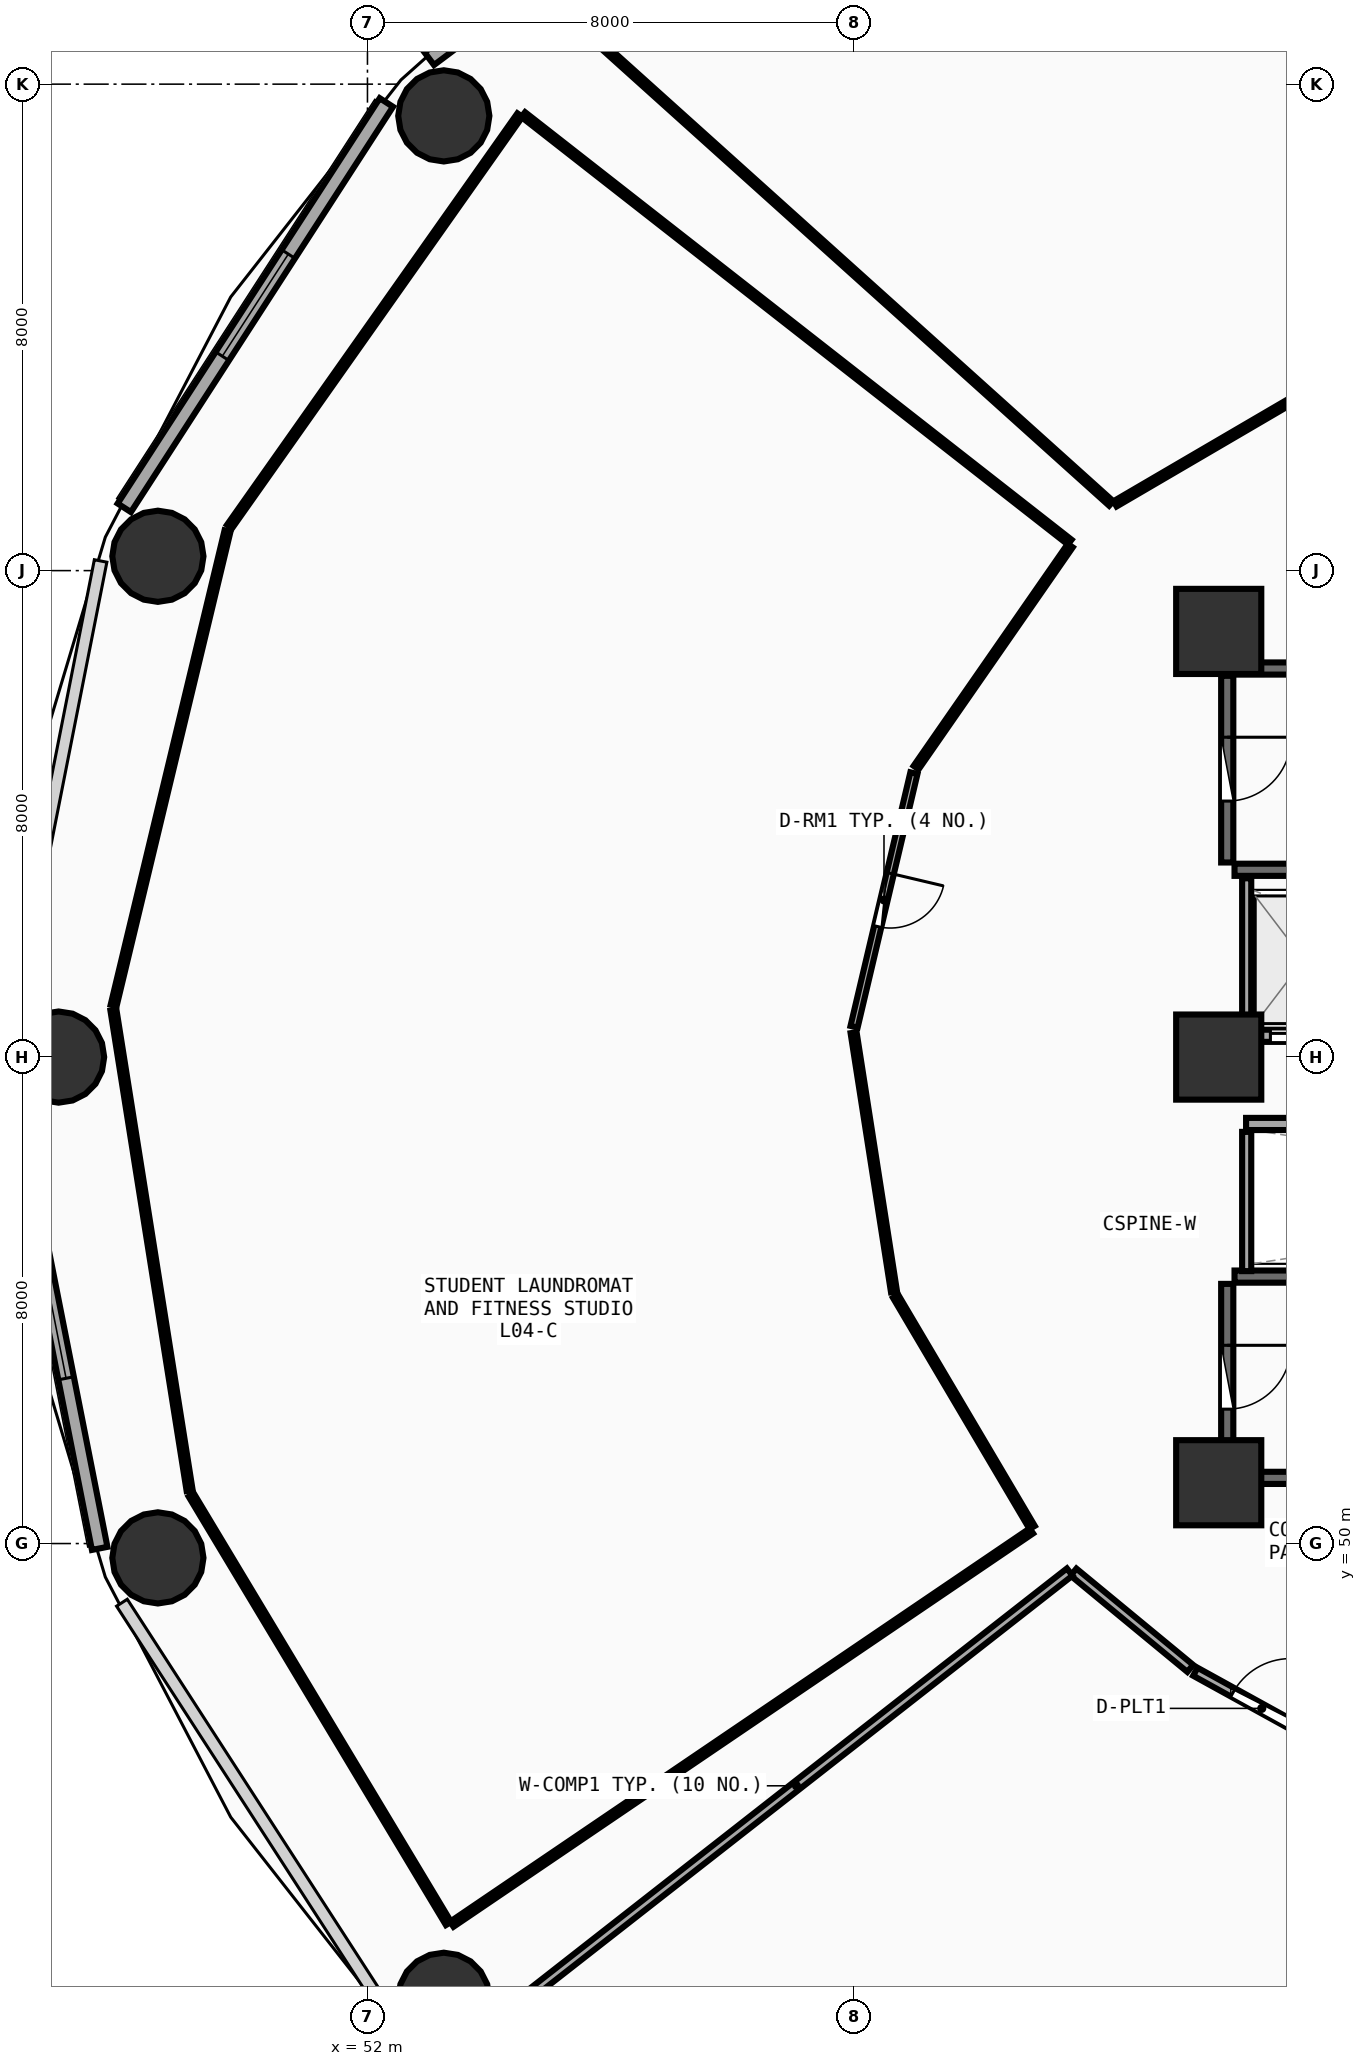
"""IFC4 building model, lengths in metres.
Left out: names, types, materials, properties, quantities, classifications, styles, units other than length and angle.
Written with IfcOpenShell. Run it as: python <this file> out.ifc"""

import sys

from ifc_helpers import new_model, si_unit, direction, frame, frame_2d, origin, origin_2d, place, context, subcontext, project, spatial, rectangle, circle, extrude, element, fill, save


model = new_model("IFC4")
c1 = context("Model", 3, precision=1e-05, world=origin(), true_north=direction((0.0, 1.0)))
c2 = subcontext(c1, "Body", "Model", "MODEL_VIEW")
j1 = project(units=[si_unit("LENGTHUNIT", "METRE"), si_unit("PLANEANGLEUNIT", "RADIAN")], contexts=[c1])
p1 = place(None, origin())
s1 = spatial("IfcSite", under=j1, at=p1, CompositionType="ELEMENT")
p2 = place(p1, origin())
s2 = spatial("IfcBuilding", under=s1, at=p2, CompositionType="ELEMENT")
p3 = place(p2, frame((0.0, 0.0, 18.0)))
s3 = spatial("IfcBuildingStorey", under=s2, at=p3, CompositionType="ELEMENT", Elevation=18.0)
for number, where, z_axis, x_axis in (
    (1, (66.0, 51.0, 0.0), (0.0, 0.0, 1.0), (1.0, 0.0, 0.0)),
    (2, (66.0, 65.0, 0.0), (0.0, 0.0, 1.0), (1.0, 0.0, 0.0)),
    (3, (66.0, 58.0, 0.0), (0.0, 0.0, 1.0), (1.0, 0.0, 0.0)),
):
    element("IfcColumn", number, at=place(p3, frame(where, z_axis=z_axis, x_axis=x_axis)), inside=s3, PredefinedType="PILASTER", context=c2, shape_type="SweptSolid", body=[
        extrude(rectangle(XDim=1.4, YDim=1.4, at=origin_2d()), origin(), (0.0, 0.0, 1.0), 4.5),
    ])
for number, where, z_axis, x_axis in (
    (4, (53.256, 73.478, 0.0), (0.0, 0.0, 1.0), (1.0, 0.0, 0.0)),
    (5, (48.553, 66.236, 0.0), (0.0, 0.0, 1.0), (1.0, 0.0, 0.0)),
    (6, (46.92, 58.0, 0.0), (0.0, 0.0, 1.0), (1.0, 0.0, 0.0)),
    (7, (48.553, 49.764, 0.0), (0.0, 0.0, 1.0), (1.0, 0.0, 0.0)),
    (8, (53.256, 42.522, 0.0), (0.0, 0.0, 1.0), (1.0, 0.0, 0.0)),
):
    element("IfcColumn", number, at=place(p3, frame(where, z_axis=z_axis, x_axis=x_axis)), inside=s3, PredefinedType="COLUMN", context=c2, shape_type="SweptSolid", body=[
        extrude(circle(Radius=0.75, at=origin_2d()), origin(), (0.0, 0.0, 1.0), 4.5),
    ])
p4 = place(p3, frame((59.651, 79.389, 0.0), z_axis=(0.0, 0.0, 1.0), x_axis=(-0.80030733173, -0.599590005569, 0.0)))
e9 = element("IfcWall", 9, at=p4, inside=s3, PredefinedType="SOLIDWALL", context=c2, shape_type="SweptSolid", body=[
    extrude(rectangle(XDim=8.291, YDim=0.26, at=frame_2d((4.145, 0.0))), origin(), (0.0, 0.0, 1.0), 4.225),
])
p5 = place(p4, frame((3.145, 0.0, 0.85)))
e10 = element("IfcOpeningElement", 10, at=p5, cuts=e9, PredefinedType="OPENING", context=c2, shape_type="SweptSolid", body=[
    extrude(rectangle(XDim=2.0, YDim=1.75, at=frame_2d((1.0, 0.875))), frame((0.0, 0.14, 0.0), z_axis=(0.0, -1.0, 0.0), x_axis=(1.0, 0.0, 0.0)), (0.0, 0.0, 1.0), 0.28),
])
p6 = place(p3, frame((52.311, 73.698, 0.0), z_axis=(0.0, 0.0, 1.0), x_axis=(-0.543005114258, -0.839729388488, 0.0)))
e11 = element("IfcWall", 11, at=p6, inside=s3, PredefinedType="SOLIDWALL", context=c2, shape_type="SweptSolid", body=[
    extrude(rectangle(XDim=7.938, YDim=0.26, at=frame_2d((3.969, 0.0))), origin(), (0.0, 0.0, 1.0), 4.225),
])
p7 = place(p6, frame((2.969, 0.0, 0.85)))
e12 = element("IfcOpeningElement", 12, at=p7, cuts=e11, PredefinedType="OPENING", context=c2, shape_type="SweptSolid", body=[
    extrude(rectangle(XDim=2.0, YDim=1.75, at=frame_2d((1.0, 0.875))), frame((0.0, 0.14, 0.0), z_axis=(0.0, -1.0, 0.0), x_axis=(1.0, 0.0, 0.0)), (0.0, 0.0, 1.0), 0.28),
])
p8 = place(p3, frame((46.104, 57.477, 0.0), z_axis=(0.0, 0.0, 1.0), x_axis=(0.193726159581, -0.98105564322, 0.0)))
e13 = element("IfcWall", 13, at=p8, inside=s3, PredefinedType="SOLIDWALL", context=c2, shape_type="SweptSolid", body=[
    extrude(rectangle(XDim=7.703, YDim=0.26, at=frame_2d((3.851, 0.0))), origin(), (0.0, 0.0, 1.0), 4.225),
])
p9 = place(p8, frame((2.851, 0.0, 0.85)))
e14 = element("IfcOpeningElement", 14, at=p9, cuts=e13, PredefinedType="OPENING", context=c2, shape_type="SweptSolid", body=[
    extrude(rectangle(XDim=2.0, YDim=1.75, at=frame_2d((1.0, 0.875))), frame((0.0, 0.14, 0.0), z_axis=(0.0, -1.0, 0.0), x_axis=(1.0, 0.0, 0.0)), (0.0, 0.0, 1.0), 0.28),
])
for number, where, z_axis, x_axis in (
    (15, (66.26, 61.08, 0.0), (0.0, 0.0, 1.0), (1.0, 0.0, 0.0)),
    (16, (73.42, 64.39, 0.0), (0.0, 0.0, 1.0), (-1.0, 0.0, 0.0)),
):
    element("IfcWall", number, at=place(p3, frame(where, z_axis=z_axis, x_axis=x_axis)), inside=s3, PredefinedType="SHEAR", context=c2, shape_type="SweptSolid", body=[
        extrude(rectangle(XDim=7.16, YDim=0.2, at=frame_2d((3.58, 0.0))), origin(), (0.0, 0.0, 1.0), 4.24),
    ])
p10 = place(p3, frame((66.14, 64.27, 0.0), z_axis=(0.0, 0.0, 1.0), x_axis=(0.0, -1.0, 0.0)))
e17 = element("IfcWall", 17, at=p10, inside=s3, PredefinedType="SHEAR", context=c2, shape_type="SweptSolid", body=[
    extrude(rectangle(XDim=3.07, YDim=0.2, at=frame_2d((1.535, 0.0))), origin(), (0.0, 0.0, 1.0), 4.24),
])
p11 = place(p10, frame((1.01, 0.0, 0.0)))
e18 = element("IfcOpeningElement", 18, at=p11, cuts=e17, PredefinedType="OPENING", context=c2, shape_type="SweptSolid", body=[
    extrude(rectangle(XDim=1.05, YDim=2.1, at=frame_2d((0.525, 1.05))), frame((0.0, 0.11, 0.0), z_axis=(0.0, -1.0, 0.0), x_axis=(1.0, 0.0, 0.0)), (0.0, 0.0, 1.0), 0.22),
])
for number, where, z_axis, x_axis in (
    (19, (66.26, 51.08, 0.0), (0.0, 0.0, 1.0), (1.0, 0.0, 0.0)),
    (20, (73.42, 54.39, 0.0), (0.0, 0.0, 1.0), (-1.0, 0.0, 0.0)),
):
    element("IfcWall", number, at=place(p3, frame(where, z_axis=z_axis, x_axis=x_axis)), inside=s3, PredefinedType="SHEAR", context=c2, shape_type="SweptSolid", body=[
        extrude(rectangle(XDim=7.16, YDim=0.2, at=frame_2d((3.58, 0.0))), origin(), (0.0, 0.0, 1.0), 4.24),
    ])
p12 = place(p3, frame((66.14, 54.27, 0.0), z_axis=(0.0, 0.0, 1.0), x_axis=(0.0, -1.0, 0.0)))
e21 = element("IfcWall", 21, at=p12, inside=s3, PredefinedType="SHEAR", context=c2, shape_type="SweptSolid", body=[
    extrude(rectangle(XDim=3.07, YDim=0.2, at=frame_2d((1.535, 0.0))), origin(), (0.0, 0.0, 1.0), 4.24),
])
p13 = place(p12, frame((1.01, 0.0, 0.0)))
e22 = element("IfcOpeningElement", 22, at=p13, cuts=e21, PredefinedType="OPENING", context=c2, shape_type="SweptSolid", body=[
    extrude(rectangle(XDim=1.05, YDim=2.1, at=frame_2d((0.525, 1.05))), frame((0.0, 0.11, 0.0), z_axis=(0.0, -1.0, 0.0), x_axis=(1.0, 0.0, 0.0)), (0.0, 0.0, 1.0), 0.22),
])
p14 = place(p3, frame((66.45, 58.35, 0.0), z_axis=(0.0, 0.0, 1.0), x_axis=(1.0, 0.0, 0.0)))
e23 = element("IfcWall", 23, at=p14, inside=s3, PredefinedType="SOLIDWALL", context=c2, shape_type="SweptSolid", body=[
    extrude(rectangle(XDim=6.0, YDim=0.2, at=frame_2d((3.0, 0.0))), origin(), (0.0, 0.0, 1.0), 4.23),
])
p15 = place(p14, frame((0.4, 0.0, 0.0)))
e24 = element("IfcOpeningElement", 24, at=p15, cuts=e23, PredefinedType="OPENING", context=c2, shape_type="SweptSolid", body=[
    extrude(rectangle(XDim=1.1, YDim=2.1, at=frame_2d((0.55, 1.05))), frame((0.0, 0.11, 0.0), z_axis=(0.0, -1.0, 0.0), x_axis=(1.0, 0.0, 0.0)), (0.0, 0.0, 1.0), 0.22),
])
p16 = place(p14, frame((2.4, 0.0, 0.0)))
e25 = element("IfcOpeningElement", 25, at=p16, cuts=e23, PredefinedType="OPENING", context=c2, shape_type="SweptSolid", body=[
    extrude(rectangle(XDim=1.1, YDim=2.1, at=frame_2d((0.55, 1.05))), frame((0.0, 0.11, 0.0), z_axis=(0.0, -1.0, 0.0), x_axis=(1.0, 0.0, 0.0)), (0.0, 0.0, 1.0), 0.22),
])
p17 = place(p14, frame((4.4, 0.0, 0.0)))
e26 = element("IfcOpeningElement", 26, at=p17, cuts=e23, PredefinedType="OPENING", context=c2, shape_type="SweptSolid", body=[
    extrude(rectangle(XDim=1.1, YDim=2.1, at=frame_2d((0.55, 1.05))), frame((0.0, 0.11, 0.0), z_axis=(0.0, -1.0, 0.0), x_axis=(1.0, 0.0, 0.0)), (0.0, 0.0, 1.0), 0.22),
])
p18 = place(p3, frame((66.46, 58.48, 0.0), z_axis=(0.0, 0.0, 1.0), x_axis=(0.0, 1.0, 0.0)))
e27 = element("IfcWall", 27, at=p18, inside=s3, PredefinedType="PARTITIONING", context=c2, shape_type="SweptSolid", body=[
    extrude(rectangle(XDim=2.46, YDim=0.15, at=frame_2d((1.23, 0.0))), origin(), (0.0, 0.0, 1.0), 4.23),
])
p19 = place(p3, frame((66.45, 56.9, 0.0), z_axis=(0.0, 0.0, 1.0), x_axis=(1.0, 0.0, 0.0)))
e28 = element("IfcWall", 28, at=p19, inside=s3, PredefinedType="SOLIDWALL", context=c2, shape_type="SweptSolid", body=[
    extrude(rectangle(XDim=14.4, YDim=0.2, at=frame_2d((7.2, 0.0))), origin(), (0.0, 0.0, 1.0), 4.23),
])
p20 = place(p3, frame((66.46, 54.48, 0.0), z_axis=(0.0, 0.0, 1.0), x_axis=(0.0, 1.0, 0.0)))
e29 = element("IfcWall", 29, at=p20, inside=s3, PredefinedType="PARTITIONING", context=c2, shape_type="SweptSolid", body=[
    extrude(rectangle(XDim=2.29, YDim=0.15, at=frame_2d((1.145, 0.0))), origin(), (0.0, 0.0, 1.0), 4.23),
])
p21 = place(p3, frame((60.987, 62.67, 0.0), z_axis=(0.0, 0.0, 1.0), x_axis=(-0.229728237891, -0.973254815922, 0.0)))
e30 = element("IfcWall", 30, at=p21, inside=s3, PredefinedType="PARTITIONING", context=c2, shape_type="SweptSolid", body=[
    extrude(rectangle(XDim=4.286, YDim=0.12, at=frame_2d((2.143, 0.0))), origin(), (0.0, 0.0, 1.0), 4.23),
])
p22 = place(p21, frame((1.693, 0.0, 0.0)))
e31 = element("IfcOpeningElement", 31, at=p22, cuts=e30, PredefinedType="OPENING", context=c2, shape_type="SweptSolid", body=[
    extrude(rectangle(XDim=0.9, YDim=2.08, at=frame_2d((0.45, 1.04))), frame((0.0, 0.07, 0.0), z_axis=(0.0, -1.0, 0.0), x_axis=(1.0, 0.0, 0.0)), (0.0, 0.0, 1.0), 0.14),
])
p23 = place(p3, frame((65.615, 47.892, 0.0), z_axis=(0.0, 0.0, 1.0), x_axis=(0.875583388941, -0.48306700261, 0.0)))
e32 = element("IfcWall", 32, at=p23, inside=s3, PredefinedType="PARTITIONING", context=c2, shape_type="SweptSolid", body=[
    extrude(rectangle(XDim=2.497, YDim=0.15, at=frame_2d((1.248, 0.0))), origin(), (0.0, 0.0, 1.0), 3.625),
])
p24 = place(p23, frame((0.708, 0.0, 0.0)))
e33 = element("IfcOpeningElement", 33, at=p24, cuts=e32, PredefinedType="OPENING", context=c2, shape_type="SweptSolid", body=[
    extrude(rectangle(XDim=1.08, YDim=2.1, at=frame_2d((0.54, 1.05))), frame((0.0, 0.085, 0.0), z_axis=(0.0, -1.0, 0.0), x_axis=(1.0, 0.0, 0.0)), (0.0, 0.0, 1.0), 0.17),
])
p25 = place(p3, frame((68.713, 69.681, 0.0), z_axis=(0.0, 0.0, 1.0), x_axis=(-0.863300951282, -0.504689476327, 0.0)))
e34 = element("IfcWall", 34, at=p25, inside=s3, PredefinedType="PARTITIONING", context=c2, shape_type="SweptSolid", body=[
    extrude(rectangle(XDim=5.117, YDim=0.1, at=frame_2d((2.559, 0.0))), origin(), (0.0, 0.0, 1.0), 3.625),
])
p26 = place(p3, frame((64.231, 67.105, 0.0), z_axis=(0.0, 0.0, 1.0), x_axis=(-0.743473519906, 0.668765373803, 0.0)))
e35 = element("IfcWall", 35, at=p26, inside=s3, PredefinedType="PARTITIONING", context=c2, shape_type="SweptSolid", body=[
    extrude(rectangle(XDim=11.301, YDim=0.1, at=frame_2d((5.65, 0.0))), origin(), (0.0, 0.0, 1.0), 3.925),
])
p27 = place(p3, frame((63.558, 66.411, 0.0), z_axis=(0.0, 0.0, 1.0), x_axis=(-0.570335061888, -0.821412148182, 0.0)))
e36 = element("IfcWall", 36, at=p27, inside=s3, PredefinedType="PARTITIONING", context=c2, shape_type="SweptSolid", body=[
    extrude(rectangle(XDim=4.444, YDim=0.1, at=frame_2d((2.222, 0.0))), origin(), (0.0, 0.0, 1.0), 3.625),
])
p28 = place(p3, frame((59.995, 58.4, 0.0), z_axis=(0.0, 0.0, 1.0), x_axis=(0.15415409869, -0.988046817644, 0.0)))
e37 = element("IfcWall", 37, at=p28, inside=s3, PredefinedType="PARTITIONING", context=c2, shape_type="SweptSolid", body=[
    extrude(rectangle(XDim=4.312, YDim=0.1, at=frame_2d((2.156, 0.0))), origin(), (0.0, 0.0, 1.0), 3.625),
])
p29 = place(p3, frame((60.686, 54.066, 0.0), z_axis=(0.0, 0.0, 1.0), x_axis=(0.508587711925, -0.861010185351, 0.0)))
e38 = element("IfcWall", 38, at=p29, inside=s3, PredefinedType="PARTITIONING", context=c2, shape_type="SweptSolid", body=[
    extrude(rectangle(XDim=4.415, YDim=0.1, at=frame_2d((2.208, 0.0))), origin(), (0.0, 0.0, 1.0), 3.625),
])
p30 = place(p3, frame((62.919, 50.208, 0.0), z_axis=(0.0, 0.0, 1.0), x_axis=(-0.827473664196, -0.561504528086, 0.0)))
e39 = element("IfcWall", 39, at=p30, inside=s3, PredefinedType="PARTITIONING", context=c2, shape_type="SweptSolid", body=[
    extrude(rectangle(XDim=11.519, YDim=0.1, at=frame_2d((5.76, 0.0))), origin(), (0.0, 0.0, 1.0), 3.925),
])
p31 = place(p3, frame((53.333, 43.751, 0.0), z_axis=(0.0, 0.0, 1.0), x_axis=(-0.514827739773, 0.857293647684, 0.0)))
e40 = element("IfcWall", 40, at=p31, inside=s3, PredefinedType="PARTITIONING", context=c2, shape_type="SweptSolid", body=[
    extrude(rectangle(XDim=8.218, YDim=0.1, at=frame_2d((4.109, 0.0))), origin(), (0.0, 0.0, 1.0), 3.625),
])
p32 = place(p3, frame((49.076, 50.871, 0.0), z_axis=(0.0, 0.0, 1.0), x_axis=(-0.156702328253, 0.987645877995, 0.0)))
e41 = element("IfcWall", 41, at=p32, inside=s3, PredefinedType="PARTITIONING", context=c2, shape_type="SweptSolid", body=[
    extrude(rectangle(XDim=7.999, YDim=0.1, at=frame_2d((4.0, 0.0))), origin(), (0.0, 0.0, 1.0), 3.625),
])
p33 = place(p3, frame((47.825, 58.849, 0.0), z_axis=(0.0, 0.0, 1.0), x_axis=(0.233462700325, 0.972365758116, 0.0)))
e42 = element("IfcWall", 42, at=p33, inside=s3, PredefinedType="PARTITIONING", context=c2, shape_type="SweptSolid", body=[
    extrude(rectangle(XDim=8.025, YDim=0.1, at=frame_2d((4.012, 0.0))), origin(), (0.0, 0.0, 1.0), 3.625),
])
p34 = place(p3, frame((49.731, 66.724, 0.0), z_axis=(0.0, 0.0, 1.0), x_axis=(0.576563997372, 0.817051991573, 0.0)))
e43 = element("IfcWall", 43, at=p34, inside=s3, PredefinedType="PARTITIONING", context=c2, shape_type="SweptSolid", body=[
    extrude(rectangle(XDim=8.283, YDim=0.1, at=frame_2d((4.142, 0.0))), origin(), (0.0, 0.0, 1.0), 3.625),
])
p35 = place(p3, frame((54.562, 73.5, 0.0), z_axis=(0.0, 0.0, 1.0), x_axis=(0.787637262368, -0.616139223657, 0.0)))
e44 = element("IfcWall", 44, at=p35, inside=s3, PredefinedType="PARTITIONING", context=c2, shape_type="SweptSolid", body=[
    extrude(rectangle(XDim=11.411, YDim=0.1, at=frame_2d((5.706, 0.0))), origin(), (0.0, 0.0, 1.0), 3.625),
])
p36 = place(p3, frame((63.612, 49.531, 0.0), z_axis=(0.0, 0.0, 1.0), x_axis=(0.771403369324, -0.636346479361, 0.0)))
e45 = element("IfcWall", 45, at=p36, inside=s3, PredefinedType="PARTITIONING", context=c2, shape_type="SweptSolid", body=[
    extrude(rectangle(XDim=2.489, YDim=0.15, at=frame_2d((1.245, 0.0))), origin(), (0.0, 0.0, 1.0), 3.625),
])
p37 = place(p3, frame((54.562, 42.5, 0.0), z_axis=(0.0, 0.0, 1.0), x_axis=(0.787637262368, 0.616139223657, 0.0)))
e46 = element("IfcWall", 46, at=p37, inside=s3, PredefinedType="PARTITIONING", context=c2, shape_type="SweptSolid", body=[
    extrude(rectangle(XDim=11.411, YDim=0.15, at=frame_2d((5.706, 0.0))), origin(), (0.0, 0.0, 1.0), 3.625),
])
p38 = place(p7, origin())
e47 = element("IfcWindow", 47, at=p38, inside=s3, PartitioningType="SINGLE_PANEL", PredefinedType="WINDOW", context=c2, shape_type="SweptSolid", body=[
    extrude(rectangle(XDim=2.0, YDim=1.75, at=frame_2d((1.0, 0.875))), frame((0.0, 0.03, 0.0), z_axis=(0.0, -1.0, 0.0), x_axis=(1.0, 0.0, 0.0)), (0.0, 0.0, 1.0), 0.06),
])
fill(e12, e47)
p39 = place(p9, origin())
e48 = element("IfcWindow", 48, at=p39, inside=s3, PartitioningType="SINGLE_PANEL", PredefinedType="WINDOW", context=c2, shape_type="SweptSolid", body=[
    extrude(rectangle(XDim=2.0, YDim=1.75, at=frame_2d((1.0, 0.875))), frame((0.0, 0.03, 0.0), z_axis=(0.0, -1.0, 0.0), x_axis=(1.0, 0.0, 0.0)), (0.0, 0.0, 1.0), 0.06),
])
fill(e14, e48)
p40 = place(p11, origin())
e49 = element("IfcDoor", 49, at=p40, inside=s3, OperationType="SINGLE_SWING_LEFT", PredefinedType="DOOR", context=c2, shape_type="SweptSolid", body=[
    extrude(rectangle(XDim=1.05, YDim=2.1, at=frame_2d((0.525, 1.05))), frame((0.0, 0.025, 0.0), z_axis=(0.0, -1.0, 0.0), x_axis=(1.0, 0.0, 0.0)), (0.0, 0.0, 1.0), 0.05),
])
fill(e18, e49)
p41 = place(p13, origin())
e50 = element("IfcDoor", 50, at=p41, inside=s3, OperationType="SINGLE_SWING_LEFT", PredefinedType="DOOR", context=c2, shape_type="SweptSolid", body=[
    extrude(rectangle(XDim=1.05, YDim=2.1, at=frame_2d((0.525, 1.05))), frame((0.0, 0.025, 0.0), z_axis=(0.0, -1.0, 0.0), x_axis=(1.0, 0.0, 0.0)), (0.0, 0.0, 1.0), 0.05),
])
fill(e22, e50)
p42 = place(p15, origin())
e51 = element("IfcDoor", 51, at=p42, inside=s3, OperationType="DOUBLE_DOOR_SLIDING", PredefinedType="DOOR", context=c2, shape_type="SweptSolid", body=[
    extrude(rectangle(XDim=1.1, YDim=2.1, at=frame_2d((0.55, 1.05))), frame((0.0, 0.025, 0.0), z_axis=(0.0, -1.0, 0.0), x_axis=(1.0, 0.0, 0.0)), (0.0, 0.0, 1.0), 0.05),
])
fill(e24, e51)
p43 = place(p22, origin())
e52 = element("IfcDoor", 52, at=p43, inside=s3, OperationType="SINGLE_SWING_LEFT", PredefinedType="DOOR", context=c2, shape_type="SweptSolid", body=[
    extrude(rectangle(XDim=0.9, YDim=2.08, at=frame_2d((0.45, 1.04))), frame((0.0, 0.025, 0.0), z_axis=(0.0, -1.0, 0.0), x_axis=(1.0, 0.0, 0.0)), (0.0, 0.0, 1.0), 0.05),
])
fill(e31, e52)
p44 = place(p24, origin())
e53 = element("IfcDoor", 53, at=p44, inside=s3, OperationType="SINGLE_SWING_RIGHT", PredefinedType="DOOR", context=c2, shape_type="SweptSolid", body=[
    extrude(rectangle(XDim=1.08, YDim=2.1, at=frame_2d((0.54, 1.05))), frame((0.0, 0.025, 0.0), z_axis=(0.0, -1.0, 0.0), x_axis=(1.0, 0.0, 0.0)), (0.0, 0.0, 1.0), 0.05),
])
fill(e33, e53)
save(model, sys.argv[1])
